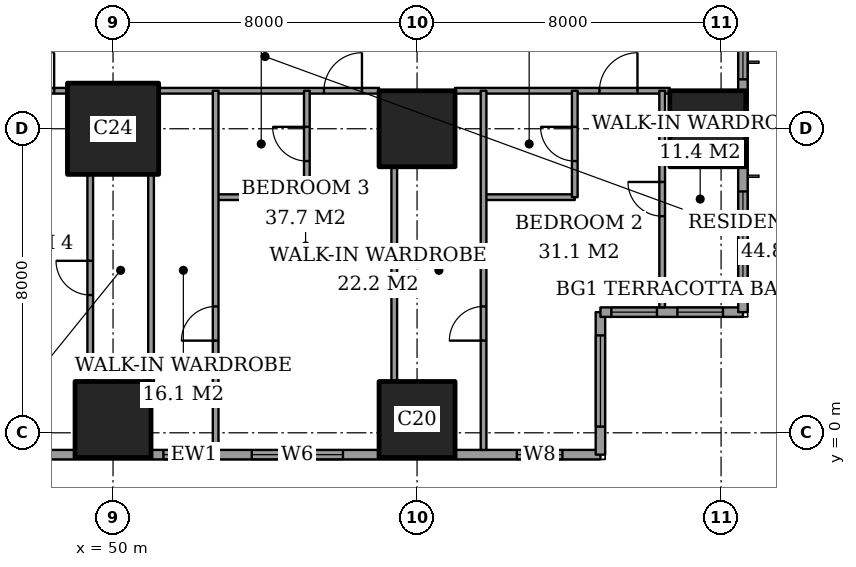
"""IFC4 building model, lengths in metres.
Left out: names, types, materials, properties, quantities, classifications, styles, units other than length and angle.
Written with IfcOpenShell. Run it as: python <this file> out.ifc"""

import sys

from ifc_helpers import new_model, si_unit, direction, frame, frame_2d, origin, origin_2d, place, context, subcontext, project, spatial, rectangle, extrude, element, fill, save


model = new_model("IFC4")
c1 = context("Model", 3, precision=1e-05, world=origin(), true_north=direction((0.0, 1.0)))
c2 = subcontext(c1, "Body", "Model", "MODEL_VIEW")
j1 = project(units=[si_unit("LENGTHUNIT", "METRE"), si_unit("PLANEANGLEUNIT", "RADIAN")], contexts=[c1])
p1 = place(None, origin())
s1 = spatial("IfcSite", under=j1, at=p1, CompositionType="ELEMENT")
p2 = place(p1, origin())
s2 = spatial("IfcBuilding", under=s1, at=p2, CompositionType="ELEMENT")
p3 = place(p2, frame((0.0, 0.0, 54.8)))
s3 = spatial("IfcBuildingStorey", under=s2, at=p3, CompositionType="ELEMENT", Elevation=54.8)
p4 = place(p3, frame((50.0, 0.35, 0.0), z_axis=(0.0, 0.0, 1.0), x_axis=(1.0, 0.0, 0.0)))
e1 = element("IfcColumn", 1, at=p4, inside=s3, PredefinedType="COLUMN", context=c2, shape_type="SweptSolid", body=[
    extrude(rectangle(XDim=2.0, YDim=2.0, at=origin_2d()), origin(), (0.0, 0.0, 1.0), 3.6),
])
p5 = place(p3, frame((50.0, 8.0, 0.0), z_axis=(0.0, 0.0, 1.0), x_axis=(1.0, 0.0, 0.0)))
e2 = element("IfcColumn", 2, at=p5, inside=s3, PredefinedType="COLUMN", context=c2, shape_type="SweptSolid", body=[
    extrude(rectangle(XDim=2.4, YDim=2.4, at=origin_2d()), origin(), (0.0, 0.0, 1.0), 3.6),
])
for number, where, z_axis, x_axis in (
    (3, (58.0, 0.35, 0.0), (0.0, 0.0, 1.0), (1.0, 0.0, 0.0)),
    (4, (58.0, 8.0, 0.0), (0.0, 0.0, 1.0), (1.0, 0.0, 0.0)),
    (5, (65.65, 8.0, 0.0), (0.0, 0.0, 1.0), (1.0, 0.0, 0.0)),
):
    element("IfcColumn", number, at=place(p3, frame(where, z_axis=z_axis, x_axis=x_axis)), inside=s3, PredefinedType="COLUMN", context=c2, shape_type="SweptSolid", body=[
        extrude(rectangle(XDim=2.0, YDim=2.0, at=origin_2d()), origin(), (0.0, 0.0, 1.0), 3.6),
    ])
p6 = place(p3, frame((41.425, -0.575, 0.0), z_axis=(0.0, 0.0, 1.0), x_axis=(1.0, 0.0, 0.0)))
e6 = element("IfcWall", 6, at=p6, inside=s3, PredefinedType="SOLIDWALL", context=c2, shape_type="SweptSolid", body=[
    extrude(rectangle(XDim=21.4, YDim=0.25, at=frame_2d((10.7, 0.0))), origin(), (0.0, 0.0, 1.0), 3.6),
])
p7 = place(p6, frame((2.3, 0.0, 0.6)))
e7 = element("IfcOpeningElement", 7, at=p7, cuts=e6, PredefinedType="OPENING", context=c2, shape_type="SweptSolid", body=[
    extrude(rectangle(XDim=1.2, YDim=2.0, at=frame_2d((0.6, 1.0))), frame((0.0, 0.135, 0.0), z_axis=(0.0, -1.0, 0.0), x_axis=(1.0, 0.0, 0.0)), (0.0, 0.0, 1.0), 0.27),
])
p8 = place(p6, frame((4.525, 0.0, 0.6)))
e8 = element("IfcOpeningElement", 8, at=p8, cuts=e6, PredefinedType="OPENING", context=c2, shape_type="SweptSolid", body=[
    extrude(rectangle(XDim=2.4, YDim=2.0, at=frame_2d((1.2, 1.0))), frame((0.0, 0.135, 0.0), z_axis=(0.0, -1.0, 0.0), x_axis=(1.0, 0.0, 0.0)), (0.0, 0.0, 1.0), 0.27),
])
p9 = place(p6, frame((9.9, 0.0, 0.6)))
e9 = element("IfcOpeningElement", 9, at=p9, cuts=e6, PredefinedType="OPENING", context=c2, shape_type="SweptSolid", body=[
    extrude(rectangle(XDim=1.2, YDim=2.0, at=frame_2d((0.6, 1.0))), frame((0.0, 0.135, 0.0), z_axis=(0.0, -1.0, 0.0), x_axis=(1.0, 0.0, 0.0)), (0.0, 0.0, 1.0), 0.27),
])
p10 = place(p6, frame((12.225, 0.0, 0.6)))
e10 = element("IfcOpeningElement", 10, at=p10, cuts=e6, PredefinedType="OPENING", context=c2, shape_type="SweptSolid", body=[
    extrude(rectangle(XDim=2.4, YDim=2.0, at=frame_2d((1.2, 1.0))), frame((0.0, 0.135, 0.0), z_axis=(0.0, -1.0, 0.0), x_axis=(1.0, 0.0, 0.0)), (0.0, 0.0, 1.0), 0.27),
])
p11 = place(p6, frame((19.2, 0.0, 0.6)))
e11 = element("IfcOpeningElement", 11, at=p11, cuts=e6, PredefinedType="OPENING", context=c2, shape_type="SweptSolid", body=[
    extrude(rectangle(XDim=1.2, YDim=2.0, at=frame_2d((0.6, 1.0))), frame((0.0, 0.135, 0.0), z_axis=(0.0, -1.0, 0.0), x_axis=(1.0, 0.0, 0.0)), (0.0, 0.0, 1.0), 0.27),
])
p12 = place(p3, frame((62.825, -0.575, 0.0), z_axis=(0.0, 0.0, 1.0), x_axis=(0.0, 1.0, 0.0)))
e12 = element("IfcWall", 12, at=p12, inside=s3, PredefinedType="SOLIDWALL", context=c2, shape_type="SweptSolid", body=[
    extrude(rectangle(XDim=3.75, YDim=0.25, at=frame_2d((1.875, 0.0))), origin(), (0.0, 0.0, 1.0), 3.6),
])
p13 = place(p12, frame((0.738, 0.0, 0.6)))
e13 = element("IfcOpeningElement", 13, at=p13, cuts=e12, PredefinedType="OPENING", context=c2, shape_type="SweptSolid", body=[
    extrude(rectangle(XDim=2.4, YDim=2.0, at=frame_2d((1.2, 1.0))), frame((0.0, 0.135, 0.0), z_axis=(0.0, -1.0, 0.0), x_axis=(1.0, 0.0, 0.0)), (0.0, 0.0, 1.0), 0.27),
])
p14 = place(p3, frame((62.825, 3.175, 0.0), z_axis=(0.0, 0.0, 1.0), x_axis=(1.0, 0.0, 0.0)))
e14 = element("IfcWall", 14, at=p14, inside=s3, PredefinedType="SOLIDWALL", context=c2, shape_type="SweptSolid", body=[
    extrude(rectangle(XDim=3.75, YDim=0.25, at=frame_2d((1.875, 0.0))), origin(), (0.0, 0.0, 1.0), 3.6),
])
p15 = place(p14, frame((0.288, 0.0, 0.6)))
e15 = element("IfcOpeningElement", 15, at=p15, cuts=e14, PredefinedType="OPENING", context=c2, shape_type="SweptSolid", body=[
    extrude(rectangle(XDim=1.2, YDim=2.0, at=frame_2d((0.6, 1.0))), frame((0.0, 0.135, 0.0), z_axis=(0.0, -1.0, 0.0), x_axis=(1.0, 0.0, 0.0)), (0.0, 0.0, 1.0), 0.27),
])
p16 = place(p14, frame((2.025, 0.0, 0.6)))
e16 = element("IfcOpeningElement", 16, at=p16, cuts=e14, PredefinedType="OPENING", context=c2, shape_type="SweptSolid", body=[
    extrude(rectangle(XDim=1.2, YDim=2.0, at=frame_2d((0.6, 1.0))), frame((0.0, 0.135, 0.0), z_axis=(0.0, -1.0, 0.0), x_axis=(1.0, 0.0, 0.0)), (0.0, 0.0, 1.0), 0.27),
])
p17 = place(p3, frame((66.575, 3.175, 0.0), z_axis=(0.0, 0.0, 1.0), x_axis=(0.0, 1.0, 0.0)))
e17 = element("IfcWall", 17, at=p17, inside=s3, PredefinedType="SOLIDWALL", context=c2, shape_type="SweptSolid", body=[
    extrude(rectangle(XDim=41.65, YDim=0.25, at=frame_2d((20.825, 0.0))), origin(), (0.0, 0.0, 1.0), 3.6),
])
p18 = place(p17, frame((0.775, 0.0, 0.6)))
e18 = element("IfcOpeningElement", 18, at=p18, cuts=e17, PredefinedType="OPENING", context=c2, shape_type="SweptSolid", body=[
    extrude(rectangle(XDim=2.4, YDim=2.0, at=frame_2d((1.2, 1.0))), frame((0.0, 0.135, 0.0), z_axis=(0.0, -1.0, 0.0), x_axis=(1.0, 0.0, 0.0)), (0.0, 0.0, 1.0), 0.27),
])
p19 = place(p17, frame((6.125, 0.0, 0.6)))
e19 = element("IfcOpeningElement", 19, at=p19, cuts=e17, PredefinedType="OPENING", context=c2, shape_type="SweptSolid", body=[
    extrude(rectangle(XDim=1.2, YDim=2.0, at=frame_2d((0.6, 1.0))), frame((0.0, 0.135, 0.0), z_axis=(0.0, -1.0, 0.0), x_axis=(1.0, 0.0, 0.0)), (0.0, 0.0, 1.0), 0.27),
])
p20 = place(p17, frame((8.375, 0.0, 0.6)))
e20 = element("IfcOpeningElement", 20, at=p20, cuts=e17, PredefinedType="OPENING", context=c2, shape_type="SweptSolid", body=[
    extrude(rectangle(XDim=2.4, YDim=2.0, at=frame_2d((1.2, 1.0))), frame((0.0, 0.135, 0.0), z_axis=(0.0, -1.0, 0.0), x_axis=(1.0, 0.0, 0.0)), (0.0, 0.0, 1.0), 0.27),
])
p21 = place(p17, frame((15.775, 0.0, 0.6)))
e21 = element("IfcOpeningElement", 21, at=p21, cuts=e17, PredefinedType="OPENING", context=c2, shape_type="SweptSolid", body=[
    extrude(rectangle(XDim=2.4, YDim=2.0, at=frame_2d((1.2, 1.0))), frame((0.0, 0.135, 0.0), z_axis=(0.0, -1.0, 0.0), x_axis=(1.0, 0.0, 0.0)), (0.0, 0.0, 1.0), 0.27),
])
p22 = place(p17, frame((23.475, 0.0, 0.6)))
e22 = element("IfcOpeningElement", 22, at=p22, cuts=e17, PredefinedType="OPENING", context=c2, shape_type="SweptSolid", body=[
    extrude(rectangle(XDim=2.4, YDim=2.0, at=frame_2d((1.2, 1.0))), frame((0.0, 0.135, 0.0), z_axis=(0.0, -1.0, 0.0), x_axis=(1.0, 0.0, 0.0)), (0.0, 0.0, 1.0), 0.27),
])
p23 = place(p17, frame((30.775, 0.0, 0.6)))
e23 = element("IfcOpeningElement", 23, at=p23, cuts=e17, PredefinedType="OPENING", context=c2, shape_type="SweptSolid", body=[
    extrude(rectangle(XDim=2.4, YDim=2.0, at=frame_2d((1.2, 1.0))), frame((0.0, 0.135, 0.0), z_axis=(0.0, -1.0, 0.0), x_axis=(1.0, 0.0, 0.0)), (0.0, 0.0, 1.0), 0.27),
])
p24 = place(p17, frame((34.125, 0.0, 0.6)))
e24 = element("IfcOpeningElement", 24, at=p24, cuts=e17, PredefinedType="OPENING", context=c2, shape_type="SweptSolid", body=[
    extrude(rectangle(XDim=1.2, YDim=2.0, at=frame_2d((0.6, 1.0))), frame((0.0, 0.135, 0.0), z_axis=(0.0, -1.0, 0.0), x_axis=(1.0, 0.0, 0.0)), (0.0, 0.0, 1.0), 0.27),
])
p25 = place(p17, frame((38.475, 0.0, 0.6)))
e25 = element("IfcOpeningElement", 25, at=p25, cuts=e17, PredefinedType="OPENING", context=c2, shape_type="SweptSolid", body=[
    extrude(rectangle(XDim=2.4, YDim=2.0, at=frame_2d((1.2, 1.0))), frame((0.0, 0.135, 0.0), z_axis=(0.0, -1.0, 0.0), x_axis=(1.0, 0.0, 0.0)), (0.0, 0.0, 1.0), 0.27),
])
p26 = place(p3, frame((52.7, 6.2, 0.0), z_axis=(0.0, 0.0, 1.0), x_axis=(1.0, 0.0, 0.0)))
e26 = element("IfcWall", 26, at=p26, inside=s3, PredefinedType="PARTITIONING", context=c2, shape_type="SweptSolid", body=[
    extrude(rectangle(XDim=2.4, YDim=0.15, at=frame_2d((1.2, 0.0))), origin(), (0.0, 0.0, 1.0), 3.35),
])
p27 = place(p3, frame((59.75, 6.2, 0.0), z_axis=(0.0, 0.0, 1.0), x_axis=(1.0, 0.0, 0.0)))
e27 = element("IfcWall", 27, at=p27, inside=s3, PredefinedType="PARTITIONING", context=c2, shape_type="SweptSolid", body=[
    extrude(rectangle(XDim=2.4, YDim=0.15, at=frame_2d((1.2, 0.0))), origin(), (0.0, 0.0, 1.0), 3.35),
])
p28 = place(p3, frame((43.35, 9.0, 0.0), z_axis=(0.0, 0.0, 1.0), x_axis=(1.0, 0.0, 0.0)))
e28 = element("IfcWall", 28, at=p28, inside=s3, PredefinedType="PARTITIONING", context=c2, shape_type="SweptSolid", body=[
    extrude(rectangle(XDim=5.45, YDim=0.15, at=frame_2d((2.725, 0.0))), origin(), (0.0, 0.0, 1.0), 3.35),
])
p29 = place(p28, frame((4.1, 0.0, 0.0)))
e29 = element("IfcOpeningElement", 29, at=p29, cuts=e28, PredefinedType="OPENING", context=c2, shape_type="SweptSolid", body=[
    extrude(rectangle(XDim=1.0, YDim=2.1, at=frame_2d((0.5, 1.05))), frame((0.0, 0.085, 0.0), z_axis=(0.0, -1.0, 0.0), x_axis=(1.0, 0.0, 0.0)), (0.0, 0.0, 1.0), 0.17),
])
p30 = place(p28, frame((0.475, 0.0, 0.0)))
e30 = element("IfcOpeningElement", 30, at=p30, cuts=e28, PredefinedType="OPENING", context=c2, shape_type="SweptSolid", body=[
    extrude(rectangle(XDim=1.0, YDim=2.1, at=frame_2d((0.5, 1.05))), frame((0.0, 0.085, 0.0), z_axis=(0.0, -1.0, 0.0), x_axis=(1.0, 0.0, 0.0)), (0.0, 0.0, 1.0), 0.17),
])
p31 = place(p3, frame((51.2, 9.0, 0.0), z_axis=(0.0, 0.0, 1.0), x_axis=(1.0, 0.0, 0.0)))
e31 = element("IfcWall", 31, at=p31, inside=s3, PredefinedType="PARTITIONING", context=c2, shape_type="SweptSolid", body=[
    extrude(rectangle(XDim=5.8, YDim=0.15, at=frame_2d((2.9, 0.0))), origin(), (0.0, 0.0, 1.0), 3.35),
])
p32 = place(p31, frame((4.35, 0.0, 0.0)))
e32 = element("IfcOpeningElement", 32, at=p32, cuts=e31, PredefinedType="OPENING", context=c2, shape_type="SweptSolid", body=[
    extrude(rectangle(XDim=1.0, YDim=2.1, at=frame_2d((0.5, 1.05))), frame((0.0, 0.085, 0.0), z_axis=(0.0, -1.0, 0.0), x_axis=(1.0, 0.0, 0.0)), (0.0, 0.0, 1.0), 0.17),
])
p33 = place(p3, frame((59.0, 9.0, 0.0), z_axis=(0.0, 0.0, 1.0), x_axis=(1.0, 0.0, 0.0)))
e33 = element("IfcWall", 33, at=p33, inside=s3, PredefinedType="PARTITIONING", context=c2, shape_type="SweptSolid", body=[
    extrude(rectangle(XDim=5.65, YDim=0.15, at=frame_2d((2.825, 0.0))), origin(), (0.0, 0.0, 1.0), 3.35),
])
p34 = place(p33, frame((3.8, 0.0, 0.0)))
e34 = element("IfcOpeningElement", 34, at=p34, cuts=e33, PredefinedType="OPENING", context=c2, shape_type="SweptSolid", body=[
    extrude(rectangle(XDim=1.0, YDim=2.1, at=frame_2d((0.5, 1.05))), frame((0.0, 0.085, 0.0), z_axis=(0.0, -1.0, 0.0), x_axis=(1.0, 0.0, 0.0)), (0.0, 0.0, 1.0), 0.17),
])
p35 = place(p3, frame((49.4, 1.35, 0.0), z_axis=(0.0, 0.0, 1.0), x_axis=(0.0, 1.0, 0.0)))
e35 = element("IfcWall", 35, at=p35, inside=s3, PredefinedType="PARTITIONING", context=c2, shape_type="SweptSolid", body=[
    extrude(rectangle(XDim=5.45, YDim=0.15, at=frame_2d((2.725, 0.0))), origin(), (0.0, 0.0, 1.0), 3.35),
])
p36 = place(p35, frame((2.275, 0.0, 0.0)))
e36 = element("IfcOpeningElement", 36, at=p36, cuts=e35, PredefinedType="OPENING", context=c2, shape_type="SweptSolid", body=[
    extrude(rectangle(XDim=0.9, YDim=2.1, at=frame_2d((0.45, 1.05))), frame((0.0, 0.085, 0.0), z_axis=(0.0, -1.0, 0.0), x_axis=(1.0, 0.0, 0.0)), (0.0, 0.0, 1.0), 0.17),
])
p37 = place(p3, frame((51.0, 1.35, 0.0), z_axis=(0.0, 0.0, 1.0), x_axis=(0.0, 1.0, 0.0)))
e37 = element("IfcWall", 37, at=p37, inside=s3, PredefinedType="PARTITIONING", context=c2, shape_type="SweptSolid", body=[
    extrude(rectangle(XDim=5.45, YDim=0.15, at=frame_2d((2.725, 0.0))), origin(), (0.0, 0.0, 1.0), 3.35),
])
p38 = place(p3, frame((52.7, -0.45, 0.0), z_axis=(0.0, 0.0, 1.0), x_axis=(0.0, 1.0, 0.0)))
e38 = element("IfcWall", 38, at=p38, inside=s3, PredefinedType="PARTITIONING", context=c2, shape_type="SweptSolid", body=[
    extrude(rectangle(XDim=9.45, YDim=0.15, at=frame_2d((4.725, 0.0))), origin(), (0.0, 0.0, 1.0), 3.35),
])
p39 = place(p38, frame((2.875, 0.0, 0.0)))
e39 = element("IfcOpeningElement", 39, at=p39, cuts=e38, PredefinedType="OPENING", context=c2, shape_type="SweptSolid", body=[
    extrude(rectangle(XDim=0.9, YDim=2.1, at=frame_2d((0.45, 1.05))), frame((0.0, 0.085, 0.0), z_axis=(0.0, -1.0, 0.0), x_axis=(1.0, 0.0, 0.0)), (0.0, 0.0, 1.0), 0.17),
])
p40 = place(p3, frame((55.1, 6.2, 0.0), z_axis=(0.0, 0.0, 1.0), x_axis=(0.0, 1.0, 0.0)))
e40 = element("IfcWall", 40, at=p40, inside=s3, PredefinedType="PARTITIONING", context=c2, shape_type="SweptSolid", body=[
    extrude(rectangle(XDim=2.8, YDim=0.15, at=frame_2d((1.4, 0.0))), origin(), (0.0, 0.0, 1.0), 3.35),
])
p41 = place(p40, frame((0.95, 0.0, 0.0)))
e41 = element("IfcOpeningElement", 41, at=p41, cuts=e40, PredefinedType="OPENING", context=c2, shape_type="SweptSolid", body=[
    extrude(rectangle(XDim=0.9, YDim=2.1, at=frame_2d((0.45, 1.05))), frame((0.0, 0.085, 0.0), z_axis=(0.0, -1.0, 0.0), x_axis=(1.0, 0.0, 0.0)), (0.0, 0.0, 1.0), 0.17),
])
p42 = place(p3, frame((57.4, 1.35, 0.0), z_axis=(0.0, 0.0, 1.0), x_axis=(0.0, 1.0, 0.0)))
e42 = element("IfcWall", 42, at=p42, inside=s3, PredefinedType="PARTITIONING", context=c2, shape_type="SweptSolid", body=[
    extrude(rectangle(XDim=5.65, YDim=0.15, at=frame_2d((2.825, 0.0))), origin(), (0.0, 0.0, 1.0), 3.35),
])
p43 = place(p3, frame((59.75, -0.45, 0.0), z_axis=(0.0, 0.0, 1.0), x_axis=(0.0, 1.0, 0.0)))
e43 = element("IfcWall", 43, at=p43, inside=s3, PredefinedType="PARTITIONING", context=c2, shape_type="SweptSolid", body=[
    extrude(rectangle(XDim=9.45, YDim=0.15, at=frame_2d((4.725, 0.0))), origin(), (0.0, 0.0, 1.0), 3.35),
])
p44 = place(p43, frame((2.875, 0.0, 0.0)))
e44 = element("IfcOpeningElement", 44, at=p44, cuts=e43, PredefinedType="OPENING", context=c2, shape_type="SweptSolid", body=[
    extrude(rectangle(XDim=0.9, YDim=2.1, at=frame_2d((0.45, 1.05))), frame((0.0, 0.085, 0.0), z_axis=(0.0, -1.0, 0.0), x_axis=(1.0, 0.0, 0.0)), (0.0, 0.0, 1.0), 0.17),
])
p45 = place(p3, frame((62.15, 6.2, 0.0), z_axis=(0.0, 0.0, 1.0), x_axis=(0.0, 1.0, 0.0)))
e45 = element("IfcWall", 45, at=p45, inside=s3, PredefinedType="PARTITIONING", context=c2, shape_type="SweptSolid", body=[
    extrude(rectangle(XDim=2.8, YDim=0.15, at=frame_2d((1.4, 0.0))), origin(), (0.0, 0.0, 1.0), 3.35),
])
p46 = place(p45, frame((0.95, 0.0, 0.0)))
e46 = element("IfcOpeningElement", 46, at=p46, cuts=e45, PredefinedType="OPENING", context=c2, shape_type="SweptSolid", body=[
    extrude(rectangle(XDim=0.9, YDim=2.1, at=frame_2d((0.45, 1.05))), frame((0.0, 0.085, 0.0), z_axis=(0.0, -1.0, 0.0), x_axis=(1.0, 0.0, 0.0)), (0.0, 0.0, 1.0), 0.17),
])
p47 = place(p3, frame((64.45, 3.3, 0.0), z_axis=(0.0, 0.0, 1.0), x_axis=(0.0, 1.0, 0.0)))
e47 = element("IfcWall", 47, at=p47, inside=s3, PredefinedType="PARTITIONING", context=c2, shape_type="SweptSolid", body=[
    extrude(rectangle(XDim=5.7, YDim=0.15, at=frame_2d((2.85, 0.0))), origin(), (0.0, 0.0, 1.0), 3.35),
])
p48 = place(p47, frame((2.4, 0.0, 0.0)))
e48 = element("IfcOpeningElement", 48, at=p48, cuts=e47, PredefinedType="OPENING", context=c2, shape_type="SweptSolid", body=[
    extrude(rectangle(XDim=0.9, YDim=2.1, at=frame_2d((0.45, 1.05))), frame((0.0, 0.085, 0.0), z_axis=(0.0, -1.0, 0.0), x_axis=(1.0, 0.0, 0.0)), (0.0, 0.0, 1.0), 0.17),
])
p49 = place(p9, origin())
e49 = element("IfcWindow", 49, at=p49, inside=s3, PartitioningType="SINGLE_PANEL", PredefinedType="WINDOW", context=c2, shape_type="SweptSolid", body=[
    extrude(rectangle(XDim=1.2, YDim=2.0, at=frame_2d((0.6, 1.0))), frame((0.0, 0.03, 0.0), z_axis=(0.0, -1.0, 0.0), x_axis=(1.0, 0.0, 0.0)), (0.0, 0.0, 1.0), 0.06),
])
fill(e9, e49)
p50 = place(p10, origin())
e50 = element("IfcWindow", 50, at=p50, inside=s3, PartitioningType="SINGLE_PANEL", PredefinedType="WINDOW", context=c2, shape_type="SweptSolid", body=[
    extrude(rectangle(XDim=2.4, YDim=2.0, at=frame_2d((1.2, 1.0))), frame((0.0, 0.03, 0.0), z_axis=(0.0, -1.0, 0.0), x_axis=(1.0, 0.0, 0.0)), (0.0, 0.0, 1.0), 0.06),
])
fill(e10, e50)
p51 = place(p11, origin())
e51 = element("IfcWindow", 51, at=p51, inside=s3, PartitioningType="SINGLE_PANEL", PredefinedType="WINDOW", context=c2, shape_type="SweptSolid", body=[
    extrude(rectangle(XDim=1.2, YDim=2.0, at=frame_2d((0.6, 1.0))), frame((0.0, 0.03, 0.0), z_axis=(0.0, -1.0, 0.0), x_axis=(1.0, 0.0, 0.0)), (0.0, 0.0, 1.0), 0.06),
])
fill(e11, e51)
p52 = place(p13, origin())
e52 = element("IfcWindow", 52, at=p52, inside=s3, PartitioningType="SINGLE_PANEL", PredefinedType="WINDOW", context=c2, shape_type="SweptSolid", body=[
    extrude(rectangle(XDim=2.4, YDim=2.0, at=frame_2d((1.2, 1.0))), frame((0.0, 0.03, 0.0), z_axis=(0.0, -1.0, 0.0), x_axis=(1.0, 0.0, 0.0)), (0.0, 0.0, 1.0), 0.06),
])
fill(e13, e52)
p53 = place(p15, origin())
e53 = element("IfcWindow", 53, at=p53, inside=s3, PartitioningType="SINGLE_PANEL", PredefinedType="WINDOW", context=c2, shape_type="SweptSolid", body=[
    extrude(rectangle(XDim=1.2, YDim=2.0, at=frame_2d((0.6, 1.0))), frame((0.0, 0.03, 0.0), z_axis=(0.0, -1.0, 0.0), x_axis=(1.0, 0.0, 0.0)), (0.0, 0.0, 1.0), 0.06),
])
fill(e15, e53)
p54 = place(p16, origin())
e54 = element("IfcWindow", 54, at=p54, inside=s3, PartitioningType="SINGLE_PANEL", PredefinedType="WINDOW", context=c2, shape_type="SweptSolid", body=[
    extrude(rectangle(XDim=1.2, YDim=2.0, at=frame_2d((0.6, 1.0))), frame((0.0, 0.03, 0.0), z_axis=(0.0, -1.0, 0.0), x_axis=(1.0, 0.0, 0.0)), (0.0, 0.0, 1.0), 0.06),
])
fill(e16, e54)
p55 = place(p18, origin())
e55 = element("IfcWindow", 55, at=p55, inside=s3, PartitioningType="SINGLE_PANEL", PredefinedType="WINDOW", context=c2, shape_type="SweptSolid", body=[
    extrude(rectangle(XDim=2.4, YDim=2.0, at=frame_2d((1.2, 1.0))), frame((0.0, 0.03, 0.0), z_axis=(0.0, -1.0, 0.0), x_axis=(1.0, 0.0, 0.0)), (0.0, 0.0, 1.0), 0.06),
])
fill(e18, e55)
p56 = place(p19, origin())
e56 = element("IfcWindow", 56, at=p56, inside=s3, PartitioningType="SINGLE_PANEL", PredefinedType="WINDOW", context=c2, shape_type="SweptSolid", body=[
    extrude(rectangle(XDim=1.2, YDim=2.0, at=frame_2d((0.6, 1.0))), frame((0.0, 0.03, 0.0), z_axis=(0.0, -1.0, 0.0), x_axis=(1.0, 0.0, 0.0)), (0.0, 0.0, 1.0), 0.06),
])
fill(e19, e56)
p57 = place(p48, origin())
e57 = element("IfcDoor", 57, at=p57, inside=s3, OperationType="SINGLE_SWING_LEFT", PredefinedType="DOOR", context=c2, shape_type="SweptSolid", body=[
    extrude(rectangle(XDim=0.9, YDim=2.1, at=frame_2d((0.45, 1.05))), frame((0.0, 0.025, 0.0), z_axis=(0.0, -1.0, 0.0), x_axis=(1.0, 0.0, 0.0)), (0.0, 0.0, 1.0), 0.05),
])
fill(e48, e57)
p58 = place(p46, origin())
e58 = element("IfcDoor", 58, at=p58, inside=s3, OperationType="SINGLE_SWING_LEFT", PredefinedType="DOOR", context=c2, shape_type="SweptSolid", body=[
    extrude(rectangle(XDim=0.9, YDim=2.1, at=frame_2d((0.45, 1.05))), frame((0.0, 0.025, 0.0), z_axis=(0.0, -1.0, 0.0), x_axis=(1.0, 0.0, 0.0)), (0.0, 0.0, 1.0), 0.05),
])
fill(e46, e58)
p59 = place(p34, origin())
e59 = element("IfcDoor", 59, at=p59, inside=s3, OperationType="SINGLE_SWING_LEFT", PredefinedType="DOOR", context=c2, shape_type="SweptSolid", body=[
    extrude(rectangle(XDim=1.0, YDim=2.1, at=frame_2d((0.5, 1.05))), frame((0.0, 0.025, 0.0), z_axis=(0.0, -1.0, 0.0), x_axis=(1.0, 0.0, 0.0)), (0.0, 0.0, 1.0), 0.05),
])
fill(e34, e59)
p60 = place(p44, origin())
e60 = element("IfcDoor", 60, at=p60, inside=s3, OperationType="SINGLE_SWING_RIGHT", PredefinedType="DOOR", context=c2, shape_type="SweptSolid", body=[
    extrude(rectangle(XDim=0.9, YDim=2.1, at=frame_2d((0.45, 1.05))), frame((0.0, 0.025, 0.0), z_axis=(0.0, -1.0, 0.0), x_axis=(1.0, 0.0, 0.0)), (0.0, 0.0, 1.0), 0.05),
])
fill(e44, e60)
p61 = place(p41, origin())
e61 = element("IfcDoor", 61, at=p61, inside=s3, OperationType="SINGLE_SWING_LEFT", PredefinedType="DOOR", context=c2, shape_type="SweptSolid", body=[
    extrude(rectangle(XDim=0.9, YDim=2.1, at=frame_2d((0.45, 1.05))), frame((0.0, 0.025, 0.0), z_axis=(0.0, -1.0, 0.0), x_axis=(1.0, 0.0, 0.0)), (0.0, 0.0, 1.0), 0.05),
])
fill(e41, e61)
p62 = place(p32, origin())
e62 = element("IfcDoor", 62, at=p62, inside=s3, OperationType="SINGLE_SWING_LEFT", PredefinedType="DOOR", context=c2, shape_type="SweptSolid", body=[
    extrude(rectangle(XDim=1.0, YDim=2.1, at=frame_2d((0.5, 1.05))), frame((0.0, 0.025, 0.0), z_axis=(0.0, -1.0, 0.0), x_axis=(1.0, 0.0, 0.0)), (0.0, 0.0, 1.0), 0.05),
])
fill(e32, e62)
p63 = place(p39, origin())
e63 = element("IfcDoor", 63, at=p63, inside=s3, OperationType="SINGLE_SWING_RIGHT", PredefinedType="DOOR", context=c2, shape_type="SweptSolid", body=[
    extrude(rectangle(XDim=0.9, YDim=2.1, at=frame_2d((0.45, 1.05))), frame((0.0, 0.025, 0.0), z_axis=(0.0, -1.0, 0.0), x_axis=(1.0, 0.0, 0.0)), (0.0, 0.0, 1.0), 0.05),
])
fill(e39, e63)
p64 = place(p36, origin())
e64 = element("IfcDoor", 64, at=p64, inside=s3, OperationType="SINGLE_SWING_LEFT", PredefinedType="DOOR", context=c2, shape_type="SweptSolid", body=[
    extrude(rectangle(XDim=0.9, YDim=2.1, at=frame_2d((0.45, 1.05))), frame((0.0, 0.025, 0.0), z_axis=(0.0, -1.0, 0.0), x_axis=(1.0, 0.0, 0.0)), (0.0, 0.0, 1.0), 0.05),
])
fill(e36, e64)
p65 = place(p29, origin())
e65 = element("IfcDoor", 65, at=p65, inside=s3, OperationType="SINGLE_SWING_LEFT", PredefinedType="DOOR", context=c2, shape_type="SweptSolid", body=[
    extrude(rectangle(XDim=1.0, YDim=2.1, at=frame_2d((0.5, 1.05))), frame((0.0, 0.025, 0.0), z_axis=(0.0, -1.0, 0.0), x_axis=(1.0, 0.0, 0.0)), (0.0, 0.0, 1.0), 0.05),
])
fill(e29, e65)
save(model, sys.argv[1])
